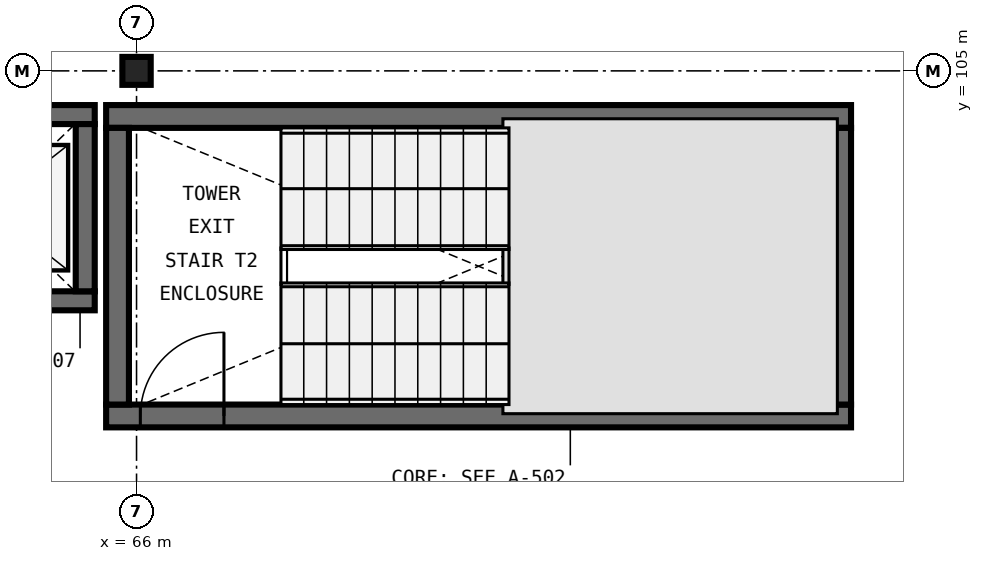
"""IFC4 building model, lengths in metres.
Left out: names, types, materials, properties, quantities, classifications, styles, units other than length and angle.
Written with IfcOpenShell. Run it as: python <this file> out.ifc"""

import sys

from ifc_helpers import new_model, si_unit, direction, frame, frame_2d, origin, origin_2d, place, context, subcontext, project, spatial, rectangle, i_section, extrude, element, fill, save


model = new_model("IFC4")
c1 = context("Model", 3, precision=1e-05, world=origin(), true_north=direction((0.0, 1.0)))
c2 = subcontext(c1, "Body", "Model", "MODEL_VIEW")
j1 = project(units=[si_unit("LENGTHUNIT", "METRE"), si_unit("PLANEANGLEUNIT", "RADIAN")], contexts=[c1])
p1 = place(None, origin())
s1 = spatial("IfcSite", under=j1, at=p1, CompositionType="ELEMENT")
p2 = place(p1, origin())
s2 = spatial("IfcBuilding", under=s1, at=p2, CompositionType="ELEMENT")
p3 = place(p2, frame((0.0, 0.0, 67.2)))
s3 = spatial("IfcBuildingStorey", under=s2, at=p3, CompositionType="ELEMENT", Elevation=67.2)
p4 = place(p3, frame((66.0, 105.0, 0.0), z_axis=(0.0, 0.0, 1.0), x_axis=(1.0, 0.0, 0.0)))
e1 = element("IfcColumn", 1, at=p4, inside=s3, PredefinedType="COLUMN", context=c2, shape_type="SweptSolid", body=[
    extrude(i_section(OverallWidth=0.373, OverallDepth=0.368, WebThickness=0.015, FlangeThickness=0.024, FilletRadius=0.031, at=origin_2d()), origin(), (0.0, 0.0, 1.0), 3.6),
])
p5 = place(p3, frame((65.6, 100.46, 0.0), z_axis=(0.0, 0.0, 1.0), x_axis=(1.0, 0.0, 0.0)))
e2 = element("IfcWall", 2, at=p5, inside=s3, PredefinedType="SHEAR", context=c2, shape_type="SweptSolid", body=[
    extrude(rectangle(XDim=9.8, YDim=0.3, at=frame_2d((4.9, 0.0))), origin(), (0.0, 0.0, 1.0), 3.6),
])
p6 = place(p5, frame((0.45, 0.0, 0.0)))
e3 = element("IfcOpeningElement", 3, at=p6, cuts=e2, PredefinedType="OPENING", context=c2, shape_type="SweptSolid", body=[
    extrude(rectangle(XDim=1.1, YDim=2.2, at=frame_2d((0.55, 1.1))), frame((0.0, 0.165, 0.0), z_axis=(0.0, -1.0, 0.0), x_axis=(1.0, 0.0, 0.0)), (0.0, 0.0, 1.0), 0.33),
])
p7 = place(p3, frame((75.4, 104.4, 0.0), z_axis=(0.0, 0.0, 1.0), x_axis=(-1.0, 0.0, 0.0)))
e4 = element("IfcWall", 4, at=p7, inside=s3, PredefinedType="SHEAR", context=c2, shape_type="SweptSolid", body=[
    extrude(rectangle(XDim=9.8, YDim=0.3, at=frame_2d((4.9, 0.0))), origin(), (0.0, 0.0, 1.0), 3.6),
])
for number, where, z_axis, x_axis in (
    (5, (65.75, 104.25, 0.0), (0.0, 0.0, 1.0), (0.0, -1.0, 0.0)),
    (6, (75.25, 100.61, 0.0), (0.0, 0.0, 1.0), (0.0, 1.0, 0.0)),
):
    element("IfcWall", number, at=place(p3, frame(where, z_axis=z_axis, x_axis=x_axis)), inside=s3, PredefinedType="SHEAR", context=c2, shape_type="SweptSolid", body=[
        extrude(rectangle(XDim=3.64, YDim=0.3, at=frame_2d((1.82, 0.0))), origin(), (0.0, 0.0, 1.0), 3.6),
    ])
p8 = place(p3, frame((62.65, 101.975, 0.0), z_axis=(0.0, 0.0, 1.0), x_axis=(1.0, 0.0, 0.0)))
e7 = element("IfcWall", 7, at=p8, inside=s3, PredefinedType="SHEAR", context=c2, shape_type="SweptSolid", body=[
    extrude(rectangle(XDim=2.8, YDim=0.25, at=frame_2d((1.4, 0.0))), origin(), (0.0, 0.0, 1.0), 3.6),
])
p9 = place(p8, frame((0.8, 0.0, 0.0)))
e8 = element("IfcOpeningElement", 8, at=p9, cuts=e7, PredefinedType="OPENING", context=c2, shape_type="SweptSolid", body=[
    extrude(rectangle(XDim=1.2, YDim=2.2, at=frame_2d((0.6, 1.1))), frame((0.0, 0.14, 0.0), z_axis=(0.0, -1.0, 0.0), x_axis=(1.0, 0.0, 0.0)), (0.0, 0.0, 1.0), 0.28),
])
p10 = place(p3, frame((65.45, 104.425, 0.0), z_axis=(0.0, 0.0, 1.0), x_axis=(-1.0, 0.0, 0.0)))
e9 = element("IfcWall", 9, at=p10, inside=s3, PredefinedType="SHEAR", context=c2, shape_type="SweptSolid", body=[
    extrude(rectangle(XDim=2.8, YDim=0.25, at=frame_2d((1.4, 0.0))), origin(), (0.0, 0.0, 1.0), 3.6),
])
p11 = place(p3, frame((65.325, 102.1, 0.0), z_axis=(0.0, 0.0, 1.0), x_axis=(0.0, 1.0, 0.0)))
e10 = element("IfcWall", 10, at=p11, inside=s3, PredefinedType="SHEAR", context=c2, shape_type="SweptSolid", body=[
    extrude(rectangle(XDim=2.2, YDim=0.25, at=frame_2d((1.1, 0.0))), origin(), (0.0, 0.0, 1.0), 3.6),
])
p12 = place(p6, origin())
e11 = element("IfcDoor", 11, at=p12, inside=s3, OperationType="SINGLE_SWING_RIGHT", PredefinedType="DOOR", context=c2, shape_type="SweptSolid", body=[
    extrude(rectangle(XDim=1.1, YDim=2.2, at=frame_2d((0.55, 1.1))), frame((0.0, 0.025, 0.0), z_axis=(0.0, -1.0, 0.0), x_axis=(1.0, 0.0, 0.0)), (0.0, 0.0, 1.0), 0.05),
])
fill(e3, e11)
save(model, sys.argv[1])
